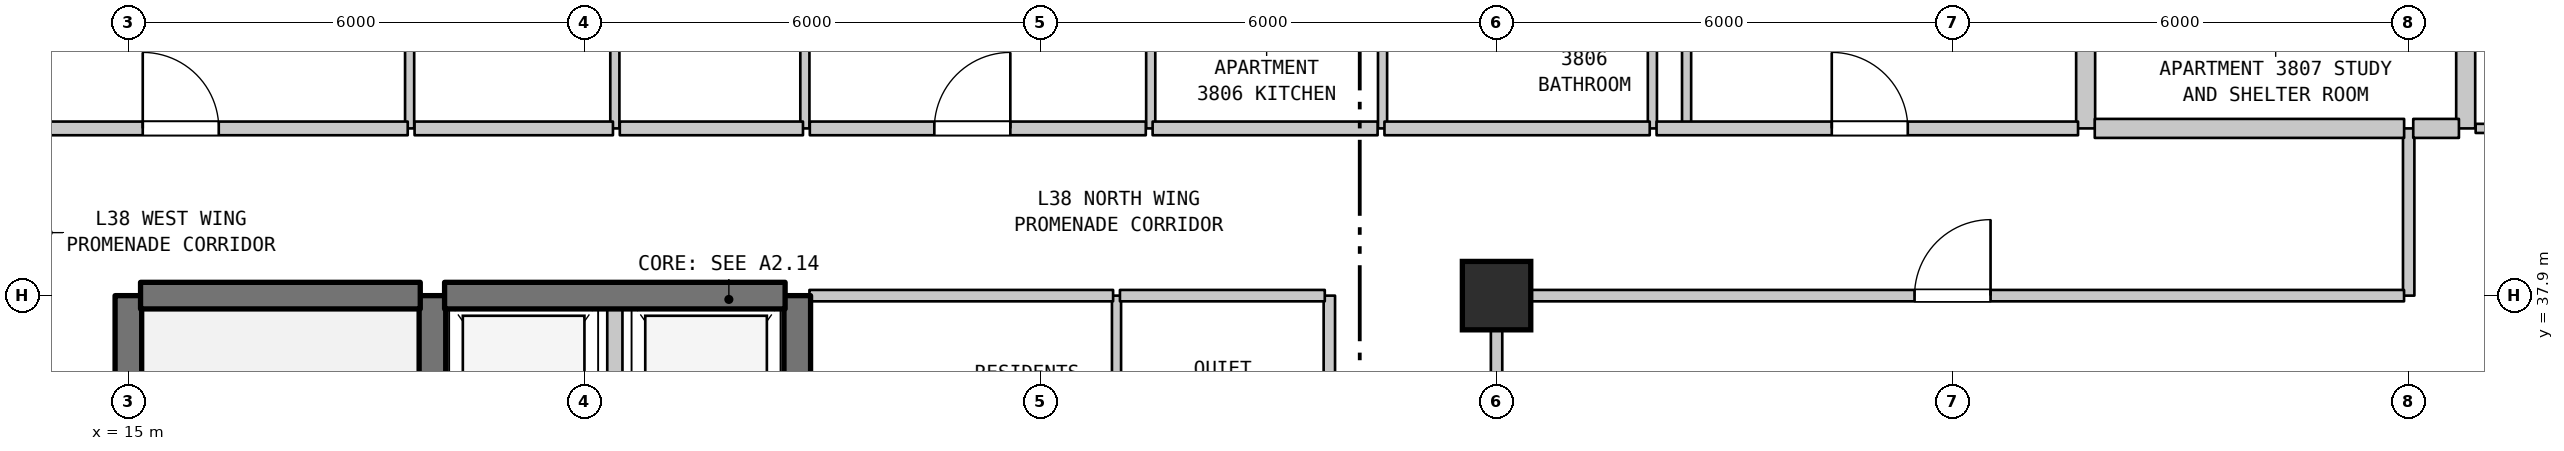
"""IFC4 building model, lengths in metres.
Left out: names, types, materials, properties, quantities, classifications, styles, units other than length and angle.
Written with IfcOpenShell. Run it as: python <this file> out.ifc"""

import sys

from ifc_helpers import new_model, si_unit, direction, frame, frame_2d, origin, origin_2d, place, context, subcontext, project, spatial, rectangle, extrude, element, fill, save


model = new_model("IFC4")
c1 = context("Model", 3, precision=1e-05, world=origin(), true_north=direction((0.0, 1.0)))
c2 = subcontext(c1, "Body", "Model", "MODEL_VIEW")
j1 = project(units=[si_unit("LENGTHUNIT", "METRE"), si_unit("PLANEANGLEUNIT", "RADIAN")], contexts=[c1])
p1 = place(None, origin())
s1 = spatial("IfcSite", under=j1, at=p1, CompositionType="ELEMENT")
p2 = place(p1, origin())
s2 = spatial("IfcBuilding", under=s1, at=p2, CompositionType="ELEMENT")
p3 = place(p2, frame((0.0, 0.0, 155.7)))
s3 = spatial("IfcBuildingStorey", under=s2, at=p3, CompositionType="ELEMENT", Elevation=155.7)
p4 = place(p3, frame((33.0, 37.9, 0.0), z_axis=(0.0, 0.0, 1.0), x_axis=(1.0, 0.0, 0.0)))
e1 = element("IfcColumn", 1, at=p4, inside=s3, PredefinedType="COLUMN", context=c2, shape_type="SweptSolid", body=[
    extrude(rectangle(XDim=0.9, YDim=0.9, at=origin_2d()), origin(), (0.0, 0.0, 1.0), 3.7),
])
p5 = place(p3, frame((15.0, 31.1, 0.0), z_axis=(0.0, 0.0, 1.0), x_axis=(0.0, 1.0, 0.0)))
e2 = element("IfcWall", 2, at=p5, inside=s3, PredefinedType="SHEAR", context=c2, shape_type="SweptSolid", body=[
    extrude(rectangle(XDim=6.8, YDim=0.35, at=frame_2d((3.4, 0.0))), origin(), (0.0, 0.0, 1.0), 3.28),
])
p6 = place(p3, frame((18.7, 40.1, 0.0), z_axis=(0.0, 0.0, 1.0), x_axis=(0.0, 1.0, 0.0)))
e3 = element("IfcWall", 3, at=p6, inside=s3, PredefinedType="PARTITIONING", context=c2, shape_type="SweptSolid", body=[
    extrude(rectangle(XDim=3.2, YDim=0.12, at=frame_2d((1.6, 0.0))), origin(), (0.0, 0.0, 1.0), 3.28),
])
p7 = place(p3, frame((19.0, 35.0, 0.0), z_axis=(0.0, 0.0, 1.0), x_axis=(0.0, 1.0, 0.0)))
e4 = element("IfcWall", 4, at=p7, inside=s3, PredefinedType="SHEAR", context=c2, shape_type="SweptSolid", body=[
    extrude(rectangle(XDim=2.9, YDim=0.35, at=frame_2d((1.45, 0.0))), origin(), (0.0, 0.0, 1.0), 3.28),
])
p8 = place(p3, frame((21.4, 35.0, 0.0), z_axis=(0.0, 0.0, 1.0), x_axis=(0.0, 1.0, 0.0)))
e5 = element("IfcWall", 5, at=p8, inside=s3, PredefinedType="STANDARD", context=c2, shape_type="SweptSolid", body=[
    extrude(rectangle(XDim=2.9, YDim=0.2, at=frame_2d((1.45, 0.0))), origin(), (0.0, 0.0, 1.0), 3.28),
])
p9 = place(p3, frame((21.4, 40.1, 0.0), z_axis=(0.0, 0.0, 1.0), x_axis=(0.0, 1.0, 0.0)))
e6 = element("IfcWall", 6, at=p9, inside=s3, PredefinedType="PARTITIONING", context=c2, shape_type="SweptSolid", body=[
    extrude(rectangle(XDim=3.2, YDim=0.12, at=frame_2d((1.6, 0.0))), origin(), (0.0, 0.0, 1.0), 3.28),
])
p10 = place(p9, frame((1.15, 0.0, 0.0)))
e7 = element("IfcOpeningElement", 7, at=p10, cuts=e6, PredefinedType="OPENING", context=c2, shape_type="SweptSolid", body=[
    extrude(rectangle(XDim=0.9, YDim=2.15, at=frame_2d((0.45, 1.075))), frame((0.0, 0.07, 0.0), z_axis=(0.0, -1.0, 0.0), x_axis=(1.0, 0.0, 0.0)), (0.0, 0.0, 1.0), 0.14),
])
p11 = place(p3, frame((23.8, 35.0, 0.0), z_axis=(0.0, 0.0, 1.0), x_axis=(0.0, 1.0, 0.0)))
e8 = element("IfcWall", 8, at=p11, inside=s3, PredefinedType="SHEAR", context=c2, shape_type="SweptSolid", body=[
    extrude(rectangle(XDim=2.9, YDim=0.35, at=frame_2d((1.45, 0.0))), origin(), (0.0, 0.0, 1.0), 3.28),
])
p12 = place(p3, frame((23.9, 40.1, 0.0), z_axis=(0.0, 0.0, 1.0), x_axis=(0.0, 1.0, 0.0)))
e9 = element("IfcWall", 9, at=p12, inside=s3, PredefinedType="PARTITIONING", context=c2, shape_type="SweptSolid", body=[
    extrude(rectangle(XDim=13.79, YDim=0.12, at=frame_2d((6.895, 0.0))), origin(), (0.0, 0.0, 1.0), 3.28),
])
p13 = place(p3, frame((28.0, 35.0, 0.0), z_axis=(0.0, 0.0, 1.0), x_axis=(0.0, 1.0, 0.0)))
e10 = element("IfcWall", 10, at=p13, inside=s3, PredefinedType="PARTITIONING", context=c2, shape_type="SweptSolid", body=[
    extrude(rectangle(XDim=2.9, YDim=0.12, at=frame_2d((1.45, 0.0))), origin(), (0.0, 0.0, 1.0), 3.28),
])
p14 = place(p3, frame((28.45, 40.1, 0.0), z_axis=(0.0, 0.0, 1.0), x_axis=(0.0, 1.0, 0.0)))
e11 = element("IfcWall", 11, at=p14, inside=s3, PredefinedType="PARTITIONING", context=c2, shape_type="SweptSolid", body=[
    extrude(rectangle(XDim=2.3, YDim=0.12, at=frame_2d((1.15, 0.0))), origin(), (0.0, 0.0, 1.0), 3.28),
])
p15 = place(p3, frame((30.8, 35.0, 0.0), z_axis=(0.0, 0.0, 1.0), x_axis=(0.0, 1.0, 0.0)))
e12 = element("IfcWall", 12, at=p15, inside=s3, PredefinedType="STANDARD", context=c2, shape_type="SweptSolid", body=[
    extrude(rectangle(XDim=2.9, YDim=0.15, at=frame_2d((1.45, 0.0))), origin(), (0.0, 0.0, 1.0), 3.28),
])
p16 = place(p3, frame((31.5, 40.1, 0.0), z_axis=(0.0, 0.0, 1.0), x_axis=(0.0, 1.0, 0.0)))
e13 = element("IfcWall", 13, at=p16, inside=s3, PredefinedType="PARTITIONING", context=c2, shape_type="SweptSolid", body=[
    extrude(rectangle(XDim=2.3, YDim=0.12, at=frame_2d((1.15, 0.0))), origin(), (0.0, 0.0, 1.0), 3.28),
])
p17 = place(p3, frame((33.0, 29.84, 0.0), z_axis=(0.0, 0.0, 1.0), x_axis=(0.0, 1.0, 0.0)))
e14 = element("IfcWall", 14, at=p17, inside=s3, PredefinedType="STANDARD", context=c2, shape_type="SweptSolid", body=[
    extrude(rectangle(XDim=8.06, YDim=0.15, at=frame_2d((4.03, 0.0))), origin(), (0.0, 0.0, 1.0), 2.78),
])
p18 = place(p17, frame((3.53, 0.0, 0.0)))
e15 = element("IfcOpeningElement", 15, at=p18, cuts=e14, PredefinedType="OPENING", context=c2, shape_type="SweptSolid", body=[
    extrude(rectangle(XDim=1.0, YDim=2.15, at=frame_2d((0.5, 1.075))), frame((0.0, 0.085, 0.0), z_axis=(0.0, -1.0, 0.0), x_axis=(1.0, 0.0, 0.0)), (0.0, 0.0, 1.0), 0.17),
])
p19 = place(p3, frame((35.05, 40.1, 0.0), z_axis=(0.0, 0.0, 1.0), x_axis=(0.0, 1.0, 0.0)))
e16 = element("IfcWall", 16, at=p19, inside=s3, PredefinedType="PARTITIONING", context=c2, shape_type="SweptSolid", body=[
    extrude(rectangle(XDim=2.3, YDim=0.12, at=frame_2d((1.15, 0.0))), origin(), (0.0, 0.0, 1.0), 3.28),
])
p20 = place(p3, frame((35.5, 40.1, 0.0), z_axis=(0.0, 0.0, 1.0), x_axis=(0.0, 1.0, 0.0)))
e17 = element("IfcWall", 17, at=p20, inside=s3, PredefinedType="PARTITIONING", context=c2, shape_type="SweptSolid", body=[
    extrude(rectangle(XDim=2.05, YDim=0.12, at=frame_2d((1.025, 0.0))), origin(), (0.0, 0.0, 1.0), 3.28),
])
p21 = place(p3, frame((40.75, 40.1, 0.0), z_axis=(0.0, 0.0, 1.0), x_axis=(0.0, 1.0, 0.0)))
e18 = element("IfcWall", 18, at=p21, inside=s3, PredefinedType="STANDARD", context=c2, shape_type="SweptSolid", body=[
    extrude(rectangle(XDim=2.3, YDim=0.25, at=frame_2d((1.15, 0.0))), origin(), (0.0, 0.0, 1.0), 3.28),
])
p22 = place(p3, frame((45.0, 37.9, 0.0), z_axis=(0.0, 0.0, 1.0), x_axis=(0.0, 1.0, 0.0)))
e19 = element("IfcWall", 19, at=p22, inside=s3, PredefinedType="STANDARD", context=c2, shape_type="SweptSolid", body=[
    extrude(rectangle(XDim=2.2, YDim=0.15, at=frame_2d((1.1, 0.0))), origin(), (0.0, 0.0, 1.0), 3.28),
])
p23 = place(p3, frame((45.75, 40.1, 0.0), z_axis=(0.0, 0.0, 1.0), x_axis=(0.0, 1.0, 0.0)))
e20 = element("IfcWall", 20, at=p23, inside=s3, PredefinedType="STANDARD", context=c2, shape_type="SweptSolid", body=[
    extrude(rectangle(XDim=2.3, YDim=0.25, at=frame_2d((1.15, 0.0))), origin(), (0.0, 0.0, 1.0), 3.28),
])
p24 = place(p3, frame((15.16, 37.9, 0.0), z_axis=(0.0, 0.0, 1.0), x_axis=(1.0, 0.0, 0.0)))
e21 = element("IfcWall", 21, at=p24, inside=s3, PredefinedType="SHEAR", context=c2, shape_type="SweptSolid", body=[
    extrude(rectangle(XDim=3.68, YDim=0.35, at=frame_2d((1.84, 0.0))), origin(), (0.0, 0.0, 1.0), 3.28),
])
p25 = place(p3, frame((19.16, 37.9, 0.0), z_axis=(0.0, 0.0, 1.0), x_axis=(1.0, 0.0, 0.0)))
e22 = element("IfcWall", 22, at=p25, inside=s3, PredefinedType="SHEAR", context=c2, shape_type="SweptSolid", body=[
    extrude(rectangle(XDim=4.48, YDim=0.35, at=frame_2d((2.24, 0.0))), origin(), (0.0, 0.0, 1.0), 3.28),
])
p26 = place(p3, frame((23.96, 37.9, 0.0), z_axis=(0.0, 0.0, 1.0), x_axis=(1.0, 0.0, 0.0)))
e23 = element("IfcWall", 23, at=p26, inside=s3, PredefinedType="STANDARD", context=c2, shape_type="SweptSolid", body=[
    extrude(rectangle(XDim=3.995, YDim=0.15, at=frame_2d((1.998, 0.0))), origin(), (0.0, 0.0, 1.0), 2.68),
])
p27 = place(p3, frame((28.045, 37.9, 0.0), z_axis=(0.0, 0.0, 1.0), x_axis=(1.0, 0.0, 0.0)))
e24 = element("IfcWall", 24, at=p27, inside=s3, PredefinedType="STANDARD", context=c2, shape_type="SweptSolid", body=[
    extrude(rectangle(XDim=2.695, YDim=0.15, at=frame_2d((1.348, 0.0))), origin(), (0.0, 0.0, 1.0), 2.68),
])
p28 = place(p3, frame((33.06, 37.9, 0.0), z_axis=(0.0, 0.0, 1.0), x_axis=(1.0, 0.0, 0.0)))
e25 = element("IfcWall", 25, at=p28, inside=s3, PredefinedType="STANDARD", context=c2, shape_type="SweptSolid", body=[
    extrude(rectangle(XDim=11.879, YDim=0.15, at=frame_2d((5.939, 0.0))), origin(), (0.0, 0.0, 1.0), 3.28),
])
p29 = place(p28, frame((5.439, 0.0, 0.0)))
e26 = element("IfcOpeningElement", 26, at=p29, cuts=e25, PredefinedType="OPENING", context=c2, shape_type="SweptSolid", body=[
    extrude(rectangle(XDim=1.0, YDim=2.15, at=frame_2d((0.5, 1.075))), frame((0.0, 0.085, 0.0), z_axis=(0.0, -1.0, 0.0), x_axis=(1.0, 0.0, 0.0)), (0.0, 0.0, 1.0), 0.17),
])
p30 = place(p3, frame((12.875, 40.1, 0.0), z_axis=(0.0, 0.0, 1.0), x_axis=(1.0, 0.0, 0.0)))
e27 = element("IfcWall", 27, at=p30, inside=s3, PredefinedType="STANDARD", context=c2, shape_type="SweptSolid", body=[
    extrude(rectangle(XDim=5.8, YDim=0.18, at=frame_2d((2.9, 0.0))), origin(), (0.0, 0.0, 1.0), 3.28),
])
p31 = place(p30, frame((2.314, 0.0, 0.0)))
e28 = element("IfcOpeningElement", 28, at=p31, cuts=e27, PredefinedType="OPENING", context=c2, shape_type="SweptSolid", body=[
    extrude(rectangle(XDim=1.0, YDim=2.15, at=frame_2d((0.5, 1.075))), frame((0.0, 0.1, 0.0), z_axis=(0.0, -1.0, 0.0), x_axis=(1.0, 0.0, 0.0)), (0.0, 0.0, 1.0), 0.2),
])
p32 = place(p3, frame((18.765, 40.1, 0.0), z_axis=(0.0, 0.0, 1.0), x_axis=(1.0, 0.0, 0.0)))
e29 = element("IfcWall", 29, at=p32, inside=s3, PredefinedType="STANDARD", context=c2, shape_type="SweptSolid", body=[
    extrude(rectangle(XDim=2.61, YDim=0.18, at=frame_2d((1.305, 0.0))), origin(), (0.0, 0.0, 1.0), 3.28),
])
p33 = place(p3, frame((21.465, 40.1, 0.0), z_axis=(0.0, 0.0, 1.0), x_axis=(1.0, 0.0, 0.0)))
e30 = element("IfcWall", 30, at=p33, inside=s3, PredefinedType="STANDARD", context=c2, shape_type="SweptSolid", body=[
    extrude(rectangle(XDim=2.41, YDim=0.18, at=frame_2d((1.205, 0.0))), origin(), (0.0, 0.0, 1.0), 3.28),
])
p34 = place(p3, frame((23.965, 40.1, 0.0), z_axis=(0.0, 0.0, 1.0), x_axis=(1.0, 0.0, 0.0)))
e31 = element("IfcWall", 31, at=p34, inside=s3, PredefinedType="STANDARD", context=c2, shape_type="SweptSolid", body=[
    extrude(rectangle(XDim=4.42, YDim=0.18, at=frame_2d((2.21, 0.0))), origin(), (0.0, 0.0, 1.0), 3.28),
])
p35 = place(p34, frame((1.638, 0.0, 0.0)))
e32 = element("IfcOpeningElement", 32, at=p35, cuts=e31, PredefinedType="OPENING", context=c2, shape_type="SweptSolid", body=[
    extrude(rectangle(XDim=1.0, YDim=2.15, at=frame_2d((0.5, 1.075))), frame((0.0, 0.1, 0.0), z_axis=(0.0, -1.0, 0.0), x_axis=(1.0, 0.0, 0.0)), (0.0, 0.0, 1.0), 0.2),
])
p36 = place(p3, frame((28.475, 40.1, 0.0), z_axis=(0.0, 0.0, 1.0), x_axis=(1.0, 0.0, 0.0)))
e33 = element("IfcWall", 33, at=p36, inside=s3, PredefinedType="STANDARD", context=c2, shape_type="SweptSolid", body=[
    extrude(rectangle(XDim=2.96, YDim=0.18, at=frame_2d((1.48, 0.0))), origin(), (0.0, 0.0, 1.0), 3.28),
])
p37 = place(p3, frame((31.525, 40.1, 0.0), z_axis=(0.0, 0.0, 1.0), x_axis=(1.0, 0.0, 0.0)))
e34 = element("IfcWall", 34, at=p37, inside=s3, PredefinedType="STANDARD", context=c2, shape_type="SweptSolid", body=[
    extrude(rectangle(XDim=3.49, YDim=0.18, at=frame_2d((1.745, 0.0))), origin(), (0.0, 0.0, 1.0), 3.28),
])
p38 = place(p3, frame((35.105, 40.1, 0.0), z_axis=(0.0, 0.0, 1.0), x_axis=(1.0, 0.0, 0.0)))
e35 = element("IfcWall", 35, at=p38, inside=s3, PredefinedType="STANDARD", context=c2, shape_type="SweptSolid", body=[
    extrude(rectangle(XDim=5.545, YDim=0.18, at=frame_2d((2.772, 0.0))), origin(), (0.0, 0.0, 1.0), 3.28),
])
p39 = place(p38, frame((2.305, 0.0, 0.0)))
e36 = element("IfcOpeningElement", 36, at=p39, cuts=e35, PredefinedType="OPENING", context=c2, shape_type="SweptSolid", body=[
    extrude(rectangle(XDim=1.0, YDim=2.15, at=frame_2d((0.5, 1.075))), frame((0.0, 0.1, 0.0), z_axis=(0.0, -1.0, 0.0), x_axis=(1.0, 0.0, 0.0)), (0.0, 0.0, 1.0), 0.2),
])
p40 = place(p3, frame((40.87, 40.1, 0.0), z_axis=(0.0, 0.0, 1.0), x_axis=(1.0, 0.0, 0.0)))
e37 = element("IfcWall", 37, at=p40, inside=s3, PredefinedType="STANDARD", context=c2, shape_type="SweptSolid", body=[
    extrude(rectangle(XDim=4.07, YDim=0.25, at=frame_2d((2.035, 0.0))), origin(), (0.0, 0.0, 1.0), 3.28),
])
p41 = place(p3, frame((45.06, 40.1, 0.0), z_axis=(0.0, 0.0, 1.0), x_axis=(1.0, 0.0, 0.0)))
e38 = element("IfcWall", 38, at=p41, inside=s3, PredefinedType="STANDARD", context=c2, shape_type="SweptSolid", body=[
    extrude(rectangle(XDim=0.601, YDim=0.25, at=frame_2d((0.3, 0.0))), origin(), (0.0, 0.0, 1.0), 3.28),
])
p42 = place(p3, frame((45.881, 40.1, 0.0), z_axis=(0.0, 0.0, 1.0), x_axis=(1.0, 0.0, 0.0)))
e39 = element("IfcWall", 39, at=p42, inside=s3, PredefinedType="PARTITIONING", context=c2, shape_type="SweptSolid", body=[
    extrude(rectangle(XDim=4.145, YDim=0.12, at=frame_2d((2.072, 0.0))), origin(), (0.0, 0.0, 1.0), 3.28),
])
p43 = place(p29, origin())
e40 = element("IfcDoor", 40, at=p43, inside=s3, OperationType="SINGLE_SWING_RIGHT", PredefinedType="DOOR", context=c2, shape_type="SweptSolid", body=[
    extrude(rectangle(XDim=1.0, YDim=2.15, at=frame_2d((0.5, 1.075))), frame((0.0, 0.025, 0.0), z_axis=(0.0, -1.0, 0.0), x_axis=(1.0, 0.0, 0.0)), (0.0, 0.0, 1.0), 0.05),
])
fill(e26, e40)
p44 = place(p31, origin())
e41 = element("IfcDoor", 41, at=p44, inside=s3, OperationType="SINGLE_SWING_LEFT", PredefinedType="DOOR", context=c2, shape_type="SweptSolid", body=[
    extrude(rectangle(XDim=1.0, YDim=2.15, at=frame_2d((0.5, 1.075))), frame((0.0, 0.025, 0.0), z_axis=(0.0, -1.0, 0.0), x_axis=(1.0, 0.0, 0.0)), (0.0, 0.0, 1.0), 0.05),
])
fill(e28, e41)
p45 = place(p35, origin())
e42 = element("IfcDoor", 42, at=p45, inside=s3, OperationType="SINGLE_SWING_RIGHT", PredefinedType="DOOR", context=c2, shape_type="SweptSolid", body=[
    extrude(rectangle(XDim=1.0, YDim=2.15, at=frame_2d((0.5, 1.075))), frame((0.0, 0.025, 0.0), z_axis=(0.0, -1.0, 0.0), x_axis=(1.0, 0.0, 0.0)), (0.0, 0.0, 1.0), 0.05),
])
fill(e32, e42)
p46 = place(p39, origin())
e43 = element("IfcDoor", 43, at=p46, inside=s3, OperationType="SINGLE_SWING_LEFT", PredefinedType="DOOR", context=c2, shape_type="SweptSolid", body=[
    extrude(rectangle(XDim=1.0, YDim=2.15, at=frame_2d((0.5, 1.075))), frame((0.0, 0.025, 0.0), z_axis=(0.0, -1.0, 0.0), x_axis=(1.0, 0.0, 0.0)), (0.0, 0.0, 1.0), 0.05),
])
fill(e36, e43)
save(model, sys.argv[1])
